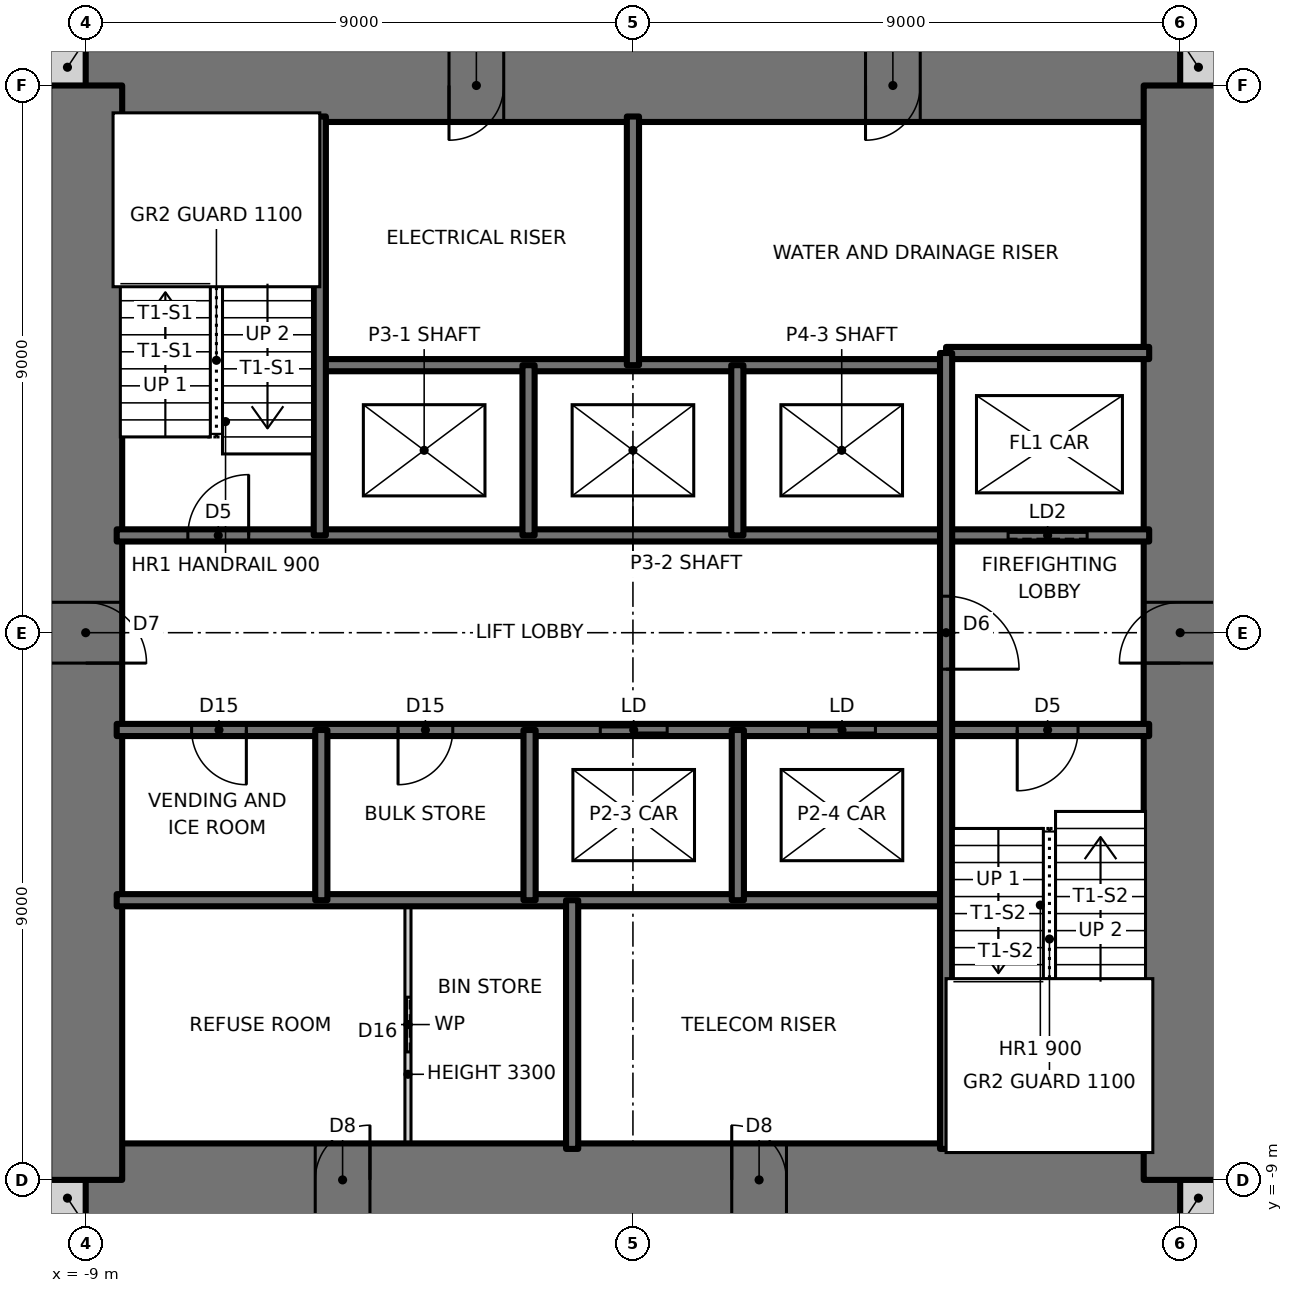
"""IFC4 building model, lengths in metres.
Left out: names, types, materials, properties, quantities, classifications, styles, units other than length and angle.
Written with IfcOpenShell. Run it as: python <this file> out.ifc"""

import sys

from ifc_helpers import new_model, si_unit, direction, frame, frame_2d, origin, place, context, subcontext, project, spatial, rectangle, extrude, element, fill, save


model = new_model("IFC4")
c1 = context("Model", 3, precision=1e-05, world=origin(), true_north=direction((0.0, 1.0)))
c2 = subcontext(c1, "Body", "Model", "MODEL_VIEW")
j1 = project(units=[si_unit("LENGTHUNIT", "METRE"), si_unit("PLANEANGLEUNIT", "RADIAN")], contexts=[c1])
p1 = place(None, origin())
s1 = spatial("IfcSite", under=j1, at=p1, CompositionType="ELEMENT")
p2 = place(p1, origin())
s2 = spatial("IfcBuilding", under=s1, at=p2, CompositionType="ELEMENT")
p3 = place(p2, frame((0.0, 0.0, 122.5)))
s3 = spatial("IfcBuildingStorey", under=s2, at=p3, CompositionType="ELEMENT", Elevation=122.5)
for number, where, z_axis, x_axis in (
    (1, (-9.6, -9.3, 0.0), (0.0, 0.0, 1.0), (1.0, 0.0, 0.0)),
    (2, (9.0, -9.3, 0.0), (0.0, 0.0, 1.0), (1.0, 0.0, 0.0)),
    (3, (9.0, 9.3, 0.0), (0.0, 0.0, 1.0), (1.0, 0.0, 0.0)),
    (4, (-9.6, 9.3, 0.0), (0.0, 0.0, 1.0), (1.0, 0.0, 0.0)),
):
    element("IfcWall", number, at=place(p3, frame(where, z_axis=z_axis, x_axis=x_axis)), inside=s3, PredefinedType="SOLIDWALL", context=c2, shape_type="SweptSolid", body=[
        extrude(rectangle(XDim=0.6, YDim=0.6, at=frame_2d((0.3, 0.0))), origin(), (0.0, 0.0, 1.0), 3.5),
    ])
p4 = place(p3, frame((-9.0, -9.0, 0.0), z_axis=(0.0, 0.0, 1.0), x_axis=(1.0, 0.0, 0.0)))
e5 = element("IfcWall", 5, at=p4, inside=s3, PredefinedType="SHEAR", context=c2, shape_type="SweptSolid", body=[
    extrude(rectangle(XDim=18.0, YDim=1.2, at=frame_2d((9.0, 0.0))), origin(), (0.0, 0.0, 1.0), 3.5),
])
p5 = place(p4, frame((3.775, 0.0, 0.0)))
e6 = element("IfcOpeningElement", 6, at=p5, cuts=e5, PredefinedType="OPENING", context=c2, shape_type="SweptSolid", body=[
    extrude(rectangle(XDim=0.9, YDim=2.1, at=frame_2d((0.45, 1.05))), frame((0.0, 0.61, 0.0), z_axis=(0.0, -1.0, 0.0), x_axis=(1.0, 0.0, 0.0)), (0.0, 0.0, 1.0), 1.22),
])
p6 = place(p4, frame((10.625, 0.0, 0.0)))
e7 = element("IfcOpeningElement", 7, at=p6, cuts=e5, PredefinedType="OPENING", context=c2, shape_type="SweptSolid", body=[
    extrude(rectangle(XDim=0.9, YDim=2.1, at=frame_2d((0.45, 1.05))), frame((0.0, 0.61, 0.0), z_axis=(0.0, -1.0, 0.0), x_axis=(1.0, 0.0, 0.0)), (0.0, 0.0, 1.0), 1.22),
])
p7 = place(p3, frame((9.0, 9.0, 0.0), z_axis=(0.0, 0.0, 1.0), x_axis=(-1.0, 0.0, 0.0)))
e8 = element("IfcWall", 8, at=p7, inside=s3, PredefinedType="SHEAR", context=c2, shape_type="SweptSolid", body=[
    extrude(rectangle(XDim=18.0, YDim=1.2, at=frame_2d((9.0, 0.0))), origin(), (0.0, 0.0, 1.0), 3.5),
])
p8 = place(p7, frame((11.125, 0.0, 0.0)))
e9 = element("IfcOpeningElement", 9, at=p8, cuts=e8, PredefinedType="OPENING", context=c2, shape_type="SweptSolid", body=[
    extrude(rectangle(XDim=0.9, YDim=2.1, at=frame_2d((0.45, 1.05))), frame((0.0, 0.61, 0.0), z_axis=(0.0, -1.0, 0.0), x_axis=(1.0, 0.0, 0.0)), (0.0, 0.0, 1.0), 1.22),
])
p9 = place(p7, frame((4.275, 0.0, 0.0)))
e10 = element("IfcOpeningElement", 10, at=p9, cuts=e8, PredefinedType="OPENING", context=c2, shape_type="SweptSolid", body=[
    extrude(rectangle(XDim=0.9, YDim=2.1, at=frame_2d((0.45, 1.05))), frame((0.0, 0.61, 0.0), z_axis=(0.0, -1.0, 0.0), x_axis=(1.0, 0.0, 0.0)), (0.0, 0.0, 1.0), 1.22),
])
p10 = place(p3, frame((9.0, -9.0, 0.0), z_axis=(0.0, 0.0, 1.0), x_axis=(0.0, 1.0, 0.0)))
e11 = element("IfcWall", 11, at=p10, inside=s3, PredefinedType="SHEAR", context=c2, shape_type="SweptSolid", body=[
    extrude(rectangle(XDim=18.0, YDim=1.2, at=frame_2d((9.0, 0.0))), origin(), (0.0, 0.0, 1.0), 3.5),
])
p11 = place(p10, frame((8.5, 0.0, 0.0)))
e12 = element("IfcOpeningElement", 12, at=p11, cuts=e11, PredefinedType="OPENING", context=c2, shape_type="SweptSolid", body=[
    extrude(rectangle(XDim=1.0, YDim=2.1, at=frame_2d((0.5, 1.05))), frame((0.0, 0.61, 0.0), z_axis=(0.0, -1.0, 0.0), x_axis=(1.0, 0.0, 0.0)), (0.0, 0.0, 1.0), 1.22),
])
p12 = place(p3, frame((-9.0, 9.0, 0.0), z_axis=(0.0, 0.0, 1.0), x_axis=(0.0, -1.0, 0.0)))
e13 = element("IfcWall", 13, at=p12, inside=s3, PredefinedType="SHEAR", context=c2, shape_type="SweptSolid", body=[
    extrude(rectangle(XDim=18.0, YDim=1.2, at=frame_2d((9.0, 0.0))), origin(), (0.0, 0.0, 1.0), 3.5),
])
p13 = place(p12, frame((8.5, 0.0, 0.0)))
e14 = element("IfcOpeningElement", 14, at=p13, cuts=e13, PredefinedType="OPENING", context=c2, shape_type="SweptSolid", body=[
    extrude(rectangle(XDim=1.0, YDim=2.1, at=frame_2d((0.5, 1.05))), frame((0.0, 0.61, 0.0), z_axis=(0.0, -1.0, 0.0), x_axis=(1.0, 0.0, 0.0)), (0.0, 0.0, 1.0), 1.22),
])
p14 = place(p3, frame((-8.49, -4.4, 0.0), z_axis=(0.0, 0.0, 1.0), x_axis=(1.0, 0.0, 0.0)))
e15 = element("IfcWall", 15, at=p14, inside=s3, PredefinedType="SOLIDWALL", context=c2, shape_type="SweptSolid", body=[
    extrude(rectangle(XDim=13.64, YDim=0.2, at=frame_2d((6.82, 0.0))), origin(), (0.0, 0.0, 1.0), 3.5),
])
p15 = place(p3, frame((-8.49, -1.6, 0.0), z_axis=(0.0, 0.0, 1.0), x_axis=(1.0, 0.0, 0.0)))
e16 = element("IfcWall", 16, at=p15, inside=s3, PredefinedType="SOLIDWALL", context=c2, shape_type="SweptSolid", body=[
    extrude(rectangle(XDim=16.98, YDim=0.2, at=frame_2d((8.49, 0.0))), origin(), (0.0, 0.0, 1.0), 3.5),
])
p16 = place(p15, frame((14.81, 0.0, 0.0)))
e17 = element("IfcOpeningElement", 17, at=p16, cuts=e16, PredefinedType="OPENING", context=c2, shape_type="SweptSolid", body=[
    extrude(rectangle(XDim=1.0, YDim=2.1, at=frame_2d((0.5, 1.05))), frame((0.0, 0.11, 0.0), z_axis=(0.0, -1.0, 0.0), x_axis=(1.0, 0.0, 0.0)), (0.0, 0.0, 1.0), 0.22),
])
p17 = place(p15, frame((1.232, 0.0, 0.0)))
e18 = element("IfcOpeningElement", 18, at=p17, cuts=e16, PredefinedType="OPENING", context=c2, shape_type="SweptSolid", body=[
    extrude(rectangle(XDim=0.9, YDim=2.1, at=frame_2d((0.45, 1.05))), frame((0.0, 0.11, 0.0), z_axis=(0.0, -1.0, 0.0), x_axis=(1.0, 0.0, 0.0)), (0.0, 0.0, 1.0), 0.22),
])
p18 = place(p15, frame((4.627, 0.0, 0.0)))
e19 = element("IfcOpeningElement", 19, at=p18, cuts=e16, PredefinedType="OPENING", context=c2, shape_type="SweptSolid", body=[
    extrude(rectangle(XDim=0.9, YDim=2.1, at=frame_2d((0.45, 1.05))), frame((0.0, 0.11, 0.0), z_axis=(0.0, -1.0, 0.0), x_axis=(1.0, 0.0, 0.0)), (0.0, 0.0, 1.0), 0.22),
])
p19 = place(p15, frame((7.953, 0.0, 0.0)))
e20 = element("IfcOpeningElement", 20, at=p19, cuts=e16, PredefinedType="OPENING", context=c2, shape_type="SweptSolid", body=[
    extrude(rectangle(XDim=1.1, YDim=2.1, at=frame_2d((0.55, 1.05))), frame((0.0, 0.11, 0.0), z_axis=(0.0, -1.0, 0.0), x_axis=(1.0, 0.0, 0.0)), (0.0, 0.0, 1.0), 0.22),
])
p20 = place(p15, frame((11.378, 0.0, 0.0)))
e21 = element("IfcOpeningElement", 21, at=p20, cuts=e16, PredefinedType="OPENING", context=c2, shape_type="SweptSolid", body=[
    extrude(rectangle(XDim=1.1, YDim=2.1, at=frame_2d((0.55, 1.05))), frame((0.0, 0.11, 0.0), z_axis=(0.0, -1.0, 0.0), x_axis=(1.0, 0.0, 0.0)), (0.0, 0.0, 1.0), 0.22),
])
p21 = place(p3, frame((-8.49, 1.6, 0.0), z_axis=(0.0, 0.0, 1.0), x_axis=(1.0, 0.0, 0.0)))
e22 = element("IfcWall", 22, at=p21, inside=s3, PredefinedType="SOLIDWALL", context=c2, shape_type="SweptSolid", body=[
    extrude(rectangle(XDim=16.98, YDim=0.2, at=frame_2d((8.49, 0.0))), origin(), (0.0, 0.0, 1.0), 3.5),
])
p22 = place(p21, frame((1.17, 0.0, 0.0)))
e23 = element("IfcOpeningElement", 23, at=p22, cuts=e22, PredefinedType="OPENING", context=c2, shape_type="SweptSolid", body=[
    extrude(rectangle(XDim=1.0, YDim=2.1, at=frame_2d((0.5, 1.05))), frame((0.0, 0.11, 0.0), z_axis=(0.0, -1.0, 0.0), x_axis=(1.0, 0.0, 0.0)), (0.0, 0.0, 1.0), 0.22),
])
p23 = place(p21, frame((14.66, 0.0, 0.0)))
e24 = element("IfcOpeningElement", 24, at=p23, cuts=e22, PredefinedType="OPENING", context=c2, shape_type="SweptSolid", body=[
    extrude(rectangle(XDim=1.3, YDim=2.1, at=frame_2d((0.65, 1.05))), frame((0.0, 0.11, 0.0), z_axis=(0.0, -1.0, 0.0), x_axis=(1.0, 0.0, 0.0)), (0.0, 0.0, 1.0), 0.22),
])
p24 = place(p3, frame((-5.15, 4.4, 0.0), z_axis=(0.0, 0.0, 1.0), x_axis=(1.0, 0.0, 0.0)))
e25 = element("IfcWall", 25, at=p24, inside=s3, PredefinedType="SOLIDWALL", context=c2, shape_type="SweptSolid", body=[
    extrude(rectangle(XDim=10.3, YDim=0.2, at=frame_2d((5.15, 0.0))), origin(), (0.0, 0.0, 1.0), 3.5),
])
p25 = place(p3, frame((5.15, 4.6, 0.0), z_axis=(0.0, 0.0, 1.0), x_axis=(1.0, 0.0, 0.0)))
e26 = element("IfcWall", 26, at=p25, inside=s3, PredefinedType="SOLIDWALL", context=c2, shape_type="SweptSolid", body=[
    extrude(rectangle(XDim=3.34, YDim=0.2, at=frame_2d((1.67, 0.0))), origin(), (0.0, 0.0, 1.0), 3.5),
])
p26 = place(p3, frame((5.15, -8.49, 0.0), z_axis=(0.0, 0.0, 1.0), x_axis=(0.0, 1.0, 0.0)))
e27 = element("IfcWall", 27, at=p26, inside=s3, PredefinedType="SOLIDWALL", context=c2, shape_type="SweptSolid", body=[
    extrude(rectangle(XDim=13.09, YDim=0.2, at=frame_2d((6.545, 0.0))), origin(), (0.0, 0.0, 1.0), 3.5),
])
p27 = place(p26, frame((7.89, 0.0, 0.0)))
e28 = element("IfcOpeningElement", 28, at=p27, cuts=e27, PredefinedType="OPENING", context=c2, shape_type="SweptSolid", body=[
    extrude(rectangle(XDim=1.2, YDim=2.1, at=frame_2d((0.6, 1.05))), frame((0.0, 0.11, 0.0), z_axis=(0.0, -1.0, 0.0), x_axis=(1.0, 0.0, 0.0)), (0.0, 0.0, 1.0), 0.22),
])
for number, where, z_axis, x_axis in (
    (29, (1.725, -4.4, 0.0), (0.0, 0.0, 1.0), (0.0, 1.0, 0.0)),
    (30, (1.717, 1.6, 0.0), (0.0, 0.0, 1.0), (0.0, 1.0, 0.0)),
):
    element("IfcWall", number, at=place(p3, frame(where, z_axis=z_axis, x_axis=x_axis)), inside=s3, PredefinedType="SOLIDWALL", context=c2, shape_type="SweptSolid", body=[
        extrude(rectangle(XDim=2.8, YDim=0.2, at=frame_2d((1.4, 0.0))), origin(), (0.0, 0.0, 1.0), 3.5),
    ])
for number, where, z_axis, x_axis in (
    (31, (0.0, 4.4, 0.0), (0.0, 0.0, 1.0), (0.0, 1.0, 0.0)),
    (32, (-1.0, -8.49, 0.0), (0.0, 0.0, 1.0), (0.0, 1.0, 0.0)),
):
    element("IfcWall", number, at=place(p3, frame(where, z_axis=z_axis, x_axis=x_axis)), inside=s3, PredefinedType="SOLIDWALL", context=c2, shape_type="SweptSolid", body=[
        extrude(rectangle(XDim=4.09, YDim=0.2, at=frame_2d((2.045, 0.0))), origin(), (0.0, 0.0, 1.0), 3.5),
    ])
for number, where, z_axis, x_axis in (
    (33, (-1.7, -4.4, 0.0), (0.0, 0.0, 1.0), (0.0, 1.0, 0.0)),
    (34, (-1.717, 1.6, 0.0), (0.0, 0.0, 1.0), (0.0, 1.0, 0.0)),
):
    element("IfcWall", number, at=place(p3, frame(where, z_axis=z_axis, x_axis=x_axis)), inside=s3, PredefinedType="SOLIDWALL", context=c2, shape_type="SweptSolid", body=[
        extrude(rectangle(XDim=2.8, YDim=0.2, at=frame_2d((1.4, 0.0))), origin(), (0.0, 0.0, 1.0), 3.5),
    ])
p28 = place(p3, frame((-3.7, -8.49, 0.0), z_axis=(0.0, 0.0, 1.0), x_axis=(0.0, 1.0, 0.0)))
e35 = element("IfcWall", 35, at=p28, inside=s3, PredefinedType="PARTITIONING", context=c2, shape_type="SweptSolid", body=[
    extrude(rectangle(XDim=4.09, YDim=0.1, at=frame_2d((2.045, 0.0))), origin(), (0.0, 0.0, 1.0), 3.3),
])
p29 = place(p28, frame((1.595, 0.0, 0.0)))
e36 = element("IfcOpeningElement", 36, at=p29, cuts=e35, PredefinedType="OPENING", context=c2, shape_type="SweptSolid", body=[
    extrude(rectangle(XDim=0.9, YDim=2.1, at=frame_2d((0.45, 1.05))), frame((0.0, 0.06, 0.0), z_axis=(0.0, -1.0, 0.0), x_axis=(1.0, 0.0, 0.0)), (0.0, 0.0, 1.0), 0.12),
])
p30 = place(p3, frame((-5.125, -4.4, 0.0), z_axis=(0.0, 0.0, 1.0), x_axis=(0.0, 1.0, 0.0)))
e37 = element("IfcWall", 37, at=p30, inside=s3, PredefinedType="SOLIDWALL", context=c2, shape_type="SweptSolid", body=[
    extrude(rectangle(XDim=2.8, YDim=0.2, at=frame_2d((1.4, 0.0))), origin(), (0.0, 0.0, 1.0), 3.5),
])
p31 = place(p3, frame((-5.15, 1.6, 0.0), z_axis=(0.0, 0.0, 1.0), x_axis=(0.0, 1.0, 0.0)))
e38 = element("IfcWall", 38, at=p31, inside=s3, PredefinedType="SOLIDWALL", context=c2, shape_type="SweptSolid", body=[
    extrude(rectangle(XDim=6.89, YDim=0.2, at=frame_2d((3.445, 0.0))), origin(), (0.0, 0.0, 1.0), 3.5),
])
p32 = place(p22, origin())
e39 = element("IfcDoor", 39, at=p32, inside=s3, OperationType="SINGLE_SWING_RIGHT", PredefinedType="DOOR", context=c2, shape_type="SweptSolid", body=[
    extrude(rectangle(XDim=1.0, YDim=2.1, at=frame_2d((0.5, 1.05))), frame((0.0, 0.025, 0.0), z_axis=(0.0, -1.0, 0.0), x_axis=(1.0, 0.0, 0.0)), (0.0, 0.0, 1.0), 0.05),
])
fill(e23, e39)
p33 = place(p16, frame((1.0, 0.0, 0.0), z_axis=(0.0, 0.0, 1.0), x_axis=(-1.0, 0.0, 0.0)))
e40 = element("IfcDoor", 40, at=p33, inside=s3, OperationType="SINGLE_SWING_RIGHT", PredefinedType="DOOR", context=c2, shape_type="SweptSolid", body=[
    extrude(rectangle(XDim=1.0, YDim=2.1, at=frame_2d((0.5, 1.05))), frame((0.0, 0.025, 0.0), z_axis=(0.0, -1.0, 0.0), x_axis=(1.0, 0.0, 0.0)), (0.0, 0.0, 1.0), 0.05),
])
fill(e17, e40)
p34 = place(p27, frame((1.2, 0.0, 0.0), z_axis=(0.0, 0.0, 1.0), x_axis=(-1.0, 0.0, 0.0)))
e41 = element("IfcDoor", 41, at=p34, inside=s3, OperationType="SINGLE_SWING_RIGHT", PredefinedType="DOOR", context=c2, shape_type="SweptSolid", body=[
    extrude(rectangle(XDim=1.2, YDim=2.1, at=frame_2d((0.6, 1.05))), frame((0.0, 0.025, 0.0), z_axis=(0.0, -1.0, 0.0), x_axis=(1.0, 0.0, 0.0)), (0.0, 0.0, 1.0), 0.05),
])
fill(e28, e41)
p35 = place(p17, frame((0.9, 0.0, 0.0), z_axis=(0.0, 0.0, 1.0), x_axis=(-1.0, 0.0, 0.0)))
e42 = element("IfcDoor", 42, at=p35, inside=s3, OperationType="SINGLE_SWING_LEFT", PredefinedType="DOOR", context=c2, shape_type="SweptSolid", body=[
    extrude(rectangle(XDim=0.9, YDim=2.1, at=frame_2d((0.45, 1.05))), frame((0.0, 0.025, 0.0), z_axis=(0.0, -1.0, 0.0), x_axis=(1.0, 0.0, 0.0)), (0.0, 0.0, 1.0), 0.05),
])
fill(e18, e42)
p36 = place(p18, frame((0.9, 0.0, 0.0), z_axis=(0.0, 0.0, 1.0), x_axis=(-1.0, 0.0, 0.0)))
e43 = element("IfcDoor", 43, at=p36, inside=s3, OperationType="SINGLE_SWING_RIGHT", PredefinedType="DOOR", context=c2, shape_type="SweptSolid", body=[
    extrude(rectangle(XDim=0.9, YDim=2.1, at=frame_2d((0.45, 1.05))), frame((0.0, 0.025, 0.0), z_axis=(0.0, -1.0, 0.0), x_axis=(1.0, 0.0, 0.0)), (0.0, 0.0, 1.0), 0.05),
])
fill(e19, e43)
p37 = place(p29, origin())
e44 = element("IfcDoor", 44, at=p37, inside=s3, OperationType="SLIDING_TO_LEFT", PredefinedType="DOOR", context=c2, shape_type="SweptSolid", body=[
    extrude(rectangle(XDim=0.9, YDim=2.1, at=frame_2d((0.45, 1.05))), frame((0.0, 0.025, 0.0), z_axis=(0.0, -1.0, 0.0), x_axis=(1.0, 0.0, 0.0)), (0.0, 0.0, 1.0), 0.05),
])
fill(e36, e44)
p38 = place(p13, origin())
e45 = element("IfcDoor", 45, at=p38, inside=s3, OperationType="SINGLE_SWING_RIGHT", PredefinedType="DOOR", context=c2, shape_type="SweptSolid", body=[
    extrude(rectangle(XDim=1.0, YDim=2.1, at=frame_2d((0.5, 1.05))), frame((0.0, 0.025, 0.0), z_axis=(0.0, -1.0, 0.0), x_axis=(1.0, 0.0, 0.0)), (0.0, 0.0, 1.0), 0.05),
])
fill(e14, e45)
p39 = place(p11, origin())
e46 = element("IfcDoor", 46, at=p39, inside=s3, OperationType="SINGLE_SWING_LEFT", PredefinedType="DOOR", context=c2, shape_type="SweptSolid", body=[
    extrude(rectangle(XDim=1.0, YDim=2.1, at=frame_2d((0.5, 1.05))), frame((0.0, 0.025, 0.0), z_axis=(0.0, -1.0, 0.0), x_axis=(1.0, 0.0, 0.0)), (0.0, 0.0, 1.0), 0.05),
])
fill(e12, e46)
p40 = place(p8, origin())
e47 = element("IfcDoor", 47, at=p40, inside=s3, OperationType="SINGLE_SWING_RIGHT", PredefinedType="DOOR", context=c2, shape_type="SweptSolid", body=[
    extrude(rectangle(XDim=0.9, YDim=2.1, at=frame_2d((0.45, 1.05))), frame((0.0, 0.025, 0.0), z_axis=(0.0, -1.0, 0.0), x_axis=(1.0, 0.0, 0.0)), (0.0, 0.0, 1.0), 0.05),
])
fill(e9, e47)
p41 = place(p9, origin())
e48 = element("IfcDoor", 48, at=p41, inside=s3, OperationType="SINGLE_SWING_RIGHT", PredefinedType="DOOR", context=c2, shape_type="SweptSolid", body=[
    extrude(rectangle(XDim=0.9, YDim=2.1, at=frame_2d((0.45, 1.05))), frame((0.0, 0.025, 0.0), z_axis=(0.0, -1.0, 0.0), x_axis=(1.0, 0.0, 0.0)), (0.0, 0.0, 1.0), 0.05),
])
fill(e10, e48)
p42 = place(p5, origin())
e49 = element("IfcDoor", 49, at=p42, inside=s3, OperationType="SINGLE_SWING_RIGHT", PredefinedType="DOOR", context=c2, shape_type="SweptSolid", body=[
    extrude(rectangle(XDim=0.9, YDim=2.1, at=frame_2d((0.45, 1.05))), frame((0.0, 0.025, 0.0), z_axis=(0.0, -1.0, 0.0), x_axis=(1.0, 0.0, 0.0)), (0.0, 0.0, 1.0), 0.05),
])
fill(e6, e49)
p43 = place(p6, origin())
e50 = element("IfcDoor", 50, at=p43, inside=s3, OperationType="SINGLE_SWING_LEFT", PredefinedType="DOOR", context=c2, shape_type="SweptSolid", body=[
    extrude(rectangle(XDim=0.9, YDim=2.1, at=frame_2d((0.45, 1.05))), frame((0.0, 0.025, 0.0), z_axis=(0.0, -1.0, 0.0), x_axis=(1.0, 0.0, 0.0)), (0.0, 0.0, 1.0), 0.05),
])
fill(e7, e50)
p44 = place(p19, origin())
e51 = element("IfcDoor", 51, at=p44, inside=s3, OperationType="DOUBLE_DOOR_SLIDING", PredefinedType="DOOR", context=c2, shape_type="SweptSolid", body=[
    extrude(rectangle(XDim=1.1, YDim=2.1, at=frame_2d((0.55, 1.05))), frame((0.0, 0.025, 0.0), z_axis=(0.0, -1.0, 0.0), x_axis=(1.0, 0.0, 0.0)), (0.0, 0.0, 1.0), 0.05),
])
fill(e20, e51)
p45 = place(p20, origin())
e52 = element("IfcDoor", 52, at=p45, inside=s3, OperationType="DOUBLE_DOOR_SLIDING", PredefinedType="DOOR", context=c2, shape_type="SweptSolid", body=[
    extrude(rectangle(XDim=1.1, YDim=2.1, at=frame_2d((0.55, 1.05))), frame((0.0, 0.025, 0.0), z_axis=(0.0, -1.0, 0.0), x_axis=(1.0, 0.0, 0.0)), (0.0, 0.0, 1.0), 0.05),
])
fill(e21, e52)
p46 = place(p23, origin())
e53 = element("IfcDoor", 53, at=p46, inside=s3, OperationType="SLIDING_TO_LEFT", PredefinedType="DOOR", context=c2, shape_type="SweptSolid", body=[
    extrude(rectangle(XDim=1.3, YDim=2.1, at=frame_2d((0.65, 1.05))), frame((0.0, 0.025, 0.0), z_axis=(0.0, -1.0, 0.0), x_axis=(1.0, 0.0, 0.0)), (0.0, 0.0, 1.0), 0.05),
])
fill(e24, e53)
save(model, sys.argv[1])
